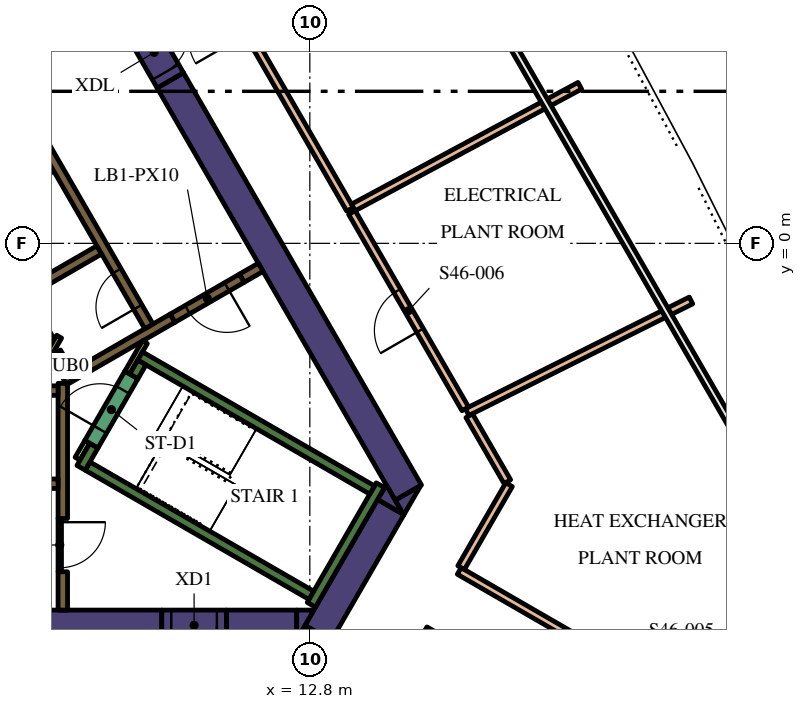
"""IFC4 building model, lengths in metres.
Left out: names, types, materials, properties, quantities, classifications, styles, units other than length and angle.
Written with IfcOpenShell. Run it as: python <this file> out.ifc"""

import sys

from ifc_helpers import new_model, si_unit, direction, frame, frame_2d, origin, place, context, subcontext, project, spatial, polyline, rectangle, outline, extrude, element, fill, save


model = new_model("IFC4")
c1 = context("Model", 3, precision=1e-05, world=origin(), true_north=direction((0.0, 1.0)))
c2 = subcontext(c1, "Body", "Model", "MODEL_VIEW")
j1 = project(units=[si_unit("LENGTHUNIT", "METRE"), si_unit("PLANEANGLEUNIT", "RADIAN")], contexts=[c1])
p1 = place(None, origin())
s1 = spatial("IfcSite", under=j1, at=p1, CompositionType="ELEMENT")
p2 = place(p1, origin())
s2 = spatial("IfcBuilding", under=s1, at=p2, CompositionType="ELEMENT")
p3 = place(p2, frame((0.0, 0.0, 196.2)))
s3 = spatial("IfcBuildingStorey", under=s2, at=p3, CompositionType="ELEMENT", Elevation=196.2)
p4 = place(p3, frame((9.129, 4.289, 0.0), z_axis=(0.0, 0.0, 1.0), x_axis=(0.499995742806, -0.866027861663, 0.0)))
e1 = element("IfcWall", 1, at=p4, inside=s3, PredefinedType="SOLIDWALL", context=c2, shape_type="SweptSolid", body=[
    extrude(rectangle(XDim=12.527, YDim=0.8, at=frame_2d((6.264, 0.0))), origin(), (0.0, 0.0, 1.0), 5.4),
])
p5 = place(p3, origin())
e2 = element("IfcWall", 2, at=p5, inside=s3, PredefinedType="SOLIDWALL", context=c2, shape_type="SweptSolid", body=[
    extrude(outline(polyline([(15.271, -7.15), (15.047, -6.762), (15.719, -6.374), (15.271, -7.15)])), origin(), (0.0, 0.0, 1.0), 5.4),
])
p6 = place(p3, frame((13.018, -10.252, 0.0), z_axis=(0.0, 0.0, 1.0), x_axis=(0.499984020225, 0.866034629516, 0.0)))
e3 = element("IfcWall", 3, at=p6, inside=s3, PredefinedType="SOLIDWALL", context=c2, shape_type="SweptSolid", body=[
    extrude(rectangle(XDim=3.824, YDim=0.8, at=frame_2d((1.912, 0.0))), origin(), (0.0, 0.0, 1.0), 5.4),
])
e4 = element("IfcWall", 4, at=p5, inside=s3, PredefinedType="SOLIDWALL", context=c2, shape_type="SweptSolid", body=[
    extrude(outline(polyline([(12.442, -10.45), (12.671, -10.053), (13.358, -10.45), (12.442, -10.45)])), origin(), (0.0, 0.0, 1.0), 5.4),
])
e5 = element("IfcWall", 5, at=p5, inside=s3, PredefinedType="SOLIDWALL", context=c2, shape_type="SweptSolid", body=[
    extrude(outline(polyline([(14.809, -6.35), (15.257, -7.126), (14.585, -6.738), (14.809, -6.35)])), origin(), (0.0, 0.0, 1.0), 5.4),
])
p7 = place(p3, frame((10.604, -10.05, 0.0), z_axis=(0.0, 0.0, 1.0), x_axis=(1.0, 0.0, 0.0)))
e6 = element("IfcWall", 6, at=p7, inside=s3, PredefinedType="SOLIDWALL", context=c2, shape_type="SweptSolid", body=[
    extrude(rectangle(XDim=1.849, YDim=0.8, at=frame_2d((0.925, 0.0))), origin(), (0.0, 0.0, 1.0), 5.4),
])
e7 = element("IfcWall", 7, at=p5, inside=s3, PredefinedType="SOLIDWALL", context=c2, shape_type="SweptSolid", body=[
    extrude(outline(polyline([(12.904, -9.65), (12.456, -10.426), (12.456, -9.65), (12.904, -9.65)])), origin(), (0.0, 0.0, 1.0), 5.4),
])
p8 = place(p3, frame((-13.378, -10.05, 0.0), z_axis=(0.0, 0.0, 1.0), x_axis=(1.0, 0.0, 0.0)))
e8 = element("IfcWall", 8, at=p8, inside=s3, PredefinedType="SOLIDWALL", context=c2, shape_type="SweptSolid", body=[
    extrude(rectangle(XDim=22.282, YDim=0.8, at=frame_2d((11.141, 0.0))), origin(), (0.0, 0.0, 1.0), 5.4),
])
p9 = place(p3, frame((12.84, -9.511, 0.0), z_axis=(0.0, 0.0, 1.0), x_axis=(0.499997733992, 0.866026712061, 0.0)))
e9 = element("IfcWall", 9, at=p9, inside=s3, PredefinedType="SOLIDWALL", context=c2, shape_type="SweptSolid", body=[
    extrude(rectangle(XDim=3.634, YDim=0.25, at=frame_2d((1.817, 0.0))), origin(), (0.0, 0.0, 1.0), 5.4),
])
p10 = place(p3, frame((12.84, -9.261, 0.0), z_axis=(0.0, 0.0, 1.0), x_axis=(-0.866013990052, 0.500019768644, 0.0)))
e10 = element("IfcWall", 10, at=p10, inside=s3, PredefinedType="SOLIDWALL", context=c2, shape_type="SweptSolid", body=[
    extrude(rectangle(XDim=6.8, YDim=0.25, at=frame_2d((3.4, 0.0))), origin(), (0.0, 0.0, 1.0), 5.4),
])
p11 = place(p3, frame((6.78, -5.906, 0.0), z_axis=(0.0, 0.0, 1.0), x_axis=(0.500223362819, 0.865896406789, 0.0)))
e11 = element("IfcWall", 11, at=p11, inside=s3, PredefinedType="SOLIDWALL", context=c2, shape_type="SweptSolid", body=[
    extrude(rectangle(XDim=0.675, YDim=0.25, at=frame_2d((0.337, 0.0))), origin(), (0.0, 0.0, 1.0), 5.4),
])
p12 = place(p3, frame((8.334, -2.964, 0.0), z_axis=(0.0, 0.0, 1.0), x_axis=(0.866016039709, -0.500016218704, 0.0)))
e12 = element("IfcWall", 12, at=p12, inside=s3, PredefinedType="SOLIDWALL", context=c2, shape_type="SweptSolid", body=[
    extrude(rectangle(XDim=7.05, YDim=0.25, at=frame_2d((3.525, 0.0))), origin(), (0.0, 0.0, 1.0), 5.4),
])
p13 = place(p3, frame((8.168, -3.503, 0.0), z_axis=(0.0, 0.0, 1.0), x_axis=(0.49972245349, 0.866185586049, 0.0)))
e13 = element("IfcWall", 13, at=p13, inside=s3, PredefinedType="SOLIDWALL", context=c2, shape_type="SweptSolid", body=[
    extrude(rectangle(XDim=0.425, YDim=0.25, at=frame_2d((0.212, 0.0))), origin(), (0.0, 0.0, 1.0), 5.4),
])
p14 = place(p3, frame((6.3, -7.24, 0.0), z_axis=(0.0, 0.0, 1.0), x_axis=(0.0, 1.0, 0.0)))
e14 = element("IfcWall", 14, at=p14, inside=s3, PredefinedType="SOLIDWALL", context=c2, shape_type="SweptSolid", body=[
    extrude(rectangle(XDim=3.556, YDim=0.25, at=frame_2d((1.778, 0.0))), origin(), (0.0, 0.0, 1.0), 5.4),
])
p15 = place(p3, frame((6.3, -9.65, 0.0), z_axis=(0.0, 0.0, 1.0), x_axis=(0.0, 1.0, 0.0)))
e15 = element("IfcWall", 15, at=p15, inside=s3, PredefinedType="SOLIDWALL", context=c2, shape_type="SweptSolid", body=[
    extrude(rectangle(XDim=1.008, YDim=0.25, at=frame_2d((0.504, 0.0))), origin(), (0.0, 0.0, 1.0), 5.4),
])
p16 = place(p3, frame((5.538, -3.875, 0.0), z_axis=(0.0, 0.0, 1.0), x_axis=(1.0, 0.0, 0.0)))
e16 = element("IfcWall", 16, at=p16, inside=s3, PredefinedType="SOLIDWALL", context=c2, shape_type="SweptSolid", body=[
    extrude(rectangle(XDim=0.637, YDim=0.25, at=frame_2d((0.318, 0.0))), origin(), (0.0, 0.0, 1.0), 5.4),
])
p17 = place(p3, frame((9.19, -1.969, 0.0), z_axis=(0.0, 0.0, 1.0), x_axis=(-0.866057109641, -0.499945079824, 0.0)))
e17 = element("IfcWall", 17, at=p17, inside=s3, PredefinedType="SOLIDWALL", context=c2, shape_type="SweptSolid", body=[
    extrude(rectangle(XDim=3.291, YDim=0.25, at=frame_2d((1.646, 0.0))), origin(), (0.0, 0.0, 1.0), 5.4),
])
p18 = place(p3, frame((6.13, -2.867, 0.0), z_axis=(0.0, 0.0, 1.0), x_axis=(0.500160776593, -0.865932559475, 0.0)))
e18 = element("IfcWall", 18, at=p18, inside=s3, PredefinedType="SOLIDWALL", context=c2, shape_type="SweptSolid", body=[
    extrude(rectangle(XDim=0.627, YDim=0.25, at=frame_2d((0.313, 0.0))), origin(), (0.0, 0.0, 1.0), 5.4),
])
p19 = place(p3, frame((11.507, -0.631, 0.0), z_axis=(0.0, 0.0, 1.0), x_axis=(-0.866093731455, -0.499881634324, 0.0)))
e19 = element("IfcWall", 19, at=p19, inside=s3, PredefinedType="SOLIDWALL", context=c2, shape_type="SweptSolid", body=[
    extrude(rectangle(XDim=0.575, YDim=0.25, at=frame_2d((0.288, 0.0))), origin(), (0.0, 0.0, 1.0), 5.4),
])
p20 = place(p3, frame((5.97, -2.591, 0.0), z_axis=(0.0, 0.0, 1.0), x_axis=(-0.499994469932, 0.866028596547, 0.0)))
e20 = element("IfcWall", 20, at=p20, inside=s3, PredefinedType="SOLIDWALL", context=c2, shape_type="SweptSolid", body=[
    extrude(rectangle(XDim=10.488, YDim=0.25, at=frame_2d((5.244, 0.0))), origin(), (0.0, 0.0, 1.0), 5.4),
])
for number, where, z_axis, x_axis in (
    (21, (4.094, 0.909, 0.0), (0.0, 0.0, 1.0), (0.866, 0.5, 0.0)),
    (22, (5.354, -1.274, 0.0), (0.0, 0.0, 1.0), (0.866, 0.5, 0.0)),
):
    element("IfcWall", number, at=place(p3, frame(where, z_axis=z_axis, x_axis=x_axis)), inside=s3, PredefinedType="SOLIDWALL", context=c2, shape_type="SweptSolid", body=[
        extrude(rectangle(XDim=2.2, YDim=0.25, at=frame_2d((1.1, 0.0))), origin(), (0.0, 0.0, 1.0), 5.4),
    ])
p21 = place(p3, frame((6.945, -5.222, 0.0), z_axis=(0.0, 0.0, 1.0), x_axis=(-0.499818422106, -0.866130212453, 0.0)))
e23 = element("IfcWall", 23, at=p21, inside=s3, PredefinedType="PARTITIONING", context=c2, shape_type="SweptSolid", body=[
    extrude(rectangle(XDim=0.514, YDim=0.15, at=frame_2d((0.257, 0.0))), origin(), (0.0, 0.0, 1.0), 4.65),
])
p22 = place(p3, frame((8.459, -2.599, 0.0), z_axis=(0.0, 0.0, 1.0), x_axis=(-0.500041054325, -0.866001699761, 0.0)))
e24 = element("IfcWall", 24, at=p22, inside=s3, PredefinedType="PARTITIONING", context=c2, shape_type="SweptSolid", body=[
    extrude(rectangle(XDim=0.929, YDim=0.15, at=frame_2d((0.464, 0.0))), origin(), (0.0, 0.0, 1.0), 5.4),
])
p23 = place(p3, frame((-6.175, -6.325, 0.0), z_axis=(0.0, 0.0, 1.0), x_axis=(1.0, 0.0, 0.0)))
e25 = element("IfcWall", 25, at=p23, inside=s3, PredefinedType="SOLIDWALL", context=c2, shape_type="SweptSolid", body=[
    extrude(rectangle(XDim=12.35, YDim=0.25, at=frame_2d((6.175, 0.0))), origin(), (0.0, 0.0, 1.0), 5.4),
])
p24 = place(p23, frame((0.585, 0.0, 0.0)))
e26 = element("IfcOpeningElement", 26, at=p24, cuts=e25, PredefinedType="OPENING", context=c2, shape_type="SweptSolid", body=[
    extrude(rectangle(XDim=1.1, YDim=2.1, at=frame_2d((0.55, 1.05))), frame((0.0, 0.135, 0.0), z_axis=(0.0, -1.0, 0.0), x_axis=(1.0, 0.0, 0.0)), (0.0, 0.0, 1.0), 0.27),
])
p25 = place(p23, frame((3.105, 0.0, 0.0)))
e27 = element("IfcOpeningElement", 27, at=p25, cuts=e25, PredefinedType="OPENING", context=c2, shape_type="SweptSolid", body=[
    extrude(rectangle(XDim=1.1, YDim=2.1, at=frame_2d((0.55, 1.05))), frame((0.0, 0.135, 0.0), z_axis=(0.0, -1.0, 0.0), x_axis=(1.0, 0.0, 0.0)), (0.0, 0.0, 1.0), 0.27),
])
p26 = place(p23, frame((5.625, 0.0, 0.0)))
e28 = element("IfcOpeningElement", 28, at=p26, cuts=e25, PredefinedType="OPENING", context=c2, shape_type="SweptSolid", body=[
    extrude(rectangle(XDim=1.1, YDim=2.1, at=frame_2d((0.55, 1.05))), frame((0.0, 0.135, 0.0), z_axis=(0.0, -1.0, 0.0), x_axis=(1.0, 0.0, 0.0)), (0.0, 0.0, 1.0), 0.27),
])
p27 = place(p23, frame((8.145, 0.0, 0.0)))
e29 = element("IfcOpeningElement", 29, at=p27, cuts=e25, PredefinedType="OPENING", context=c2, shape_type="SweptSolid", body=[
    extrude(rectangle(XDim=1.1, YDim=2.1, at=frame_2d((0.55, 1.05))), frame((0.0, 0.135, 0.0), z_axis=(0.0, -1.0, 0.0), x_axis=(1.0, 0.0, 0.0)), (0.0, 0.0, 1.0), 0.27),
])
p28 = place(p23, frame((10.665, 0.0, 0.0)))
e30 = element("IfcOpeningElement", 30, at=p28, cuts=e25, PredefinedType="OPENING", context=c2, shape_type="SweptSolid", body=[
    extrude(rectangle(XDim=1.1, YDim=2.1, at=frame_2d((0.55, 1.05))), frame((0.0, 0.135, 0.0), z_axis=(0.0, -1.0, 0.0), x_axis=(1.0, 0.0, 0.0)), (0.0, 0.0, 1.0), 0.27),
])
p29 = place(p3, frame((8.565, -2.185, 0.0), z_axis=(0.0, 0.0, 1.0), x_axis=(-0.499997954832, 0.866026584559, 0.0)))
e31 = element("IfcWall", 31, at=p29, inside=s3, PredefinedType="SOLIDWALL", context=c2, shape_type="SweptSolid", body=[
    extrude(rectangle(XDim=12.35, YDim=0.25, at=frame_2d((6.175, 0.0))), origin(), (0.0, 0.0, 1.0), 5.4),
])
p30 = place(p29, frame((0.585, 0.0, 0.0)))
e32 = element("IfcOpeningElement", 32, at=p30, cuts=e31, PredefinedType="OPENING", context=c2, shape_type="SweptSolid", body=[
    extrude(rectangle(XDim=1.1, YDim=2.1, at=frame_2d((0.55, 1.05))), frame((0.0, 0.135, 0.0), z_axis=(0.0, -1.0, 0.0), x_axis=(1.0, 0.0, 0.0)), (0.0, 0.0, 1.0), 0.27),
])
p31 = place(p3, frame((7.053, -5.284, 0.0), z_axis=(0.0, 0.0, 1.0), x_axis=(0.500078061341, 0.865980330357, 0.0)))
e33 = element("IfcWall", 33, at=p31, inside=s3, PredefinedType="SOLIDWALL", context=c2, shape_type="SweptSolid", body=[
    extrude(rectangle(XDim=2.1, YDim=0.4, at=frame_2d((1.05, 0.0))), origin(), (0.0, 0.0, 1.0), 5.4),
])
p32 = place(p31, frame((0.45, 0.0, 0.0)))
e34 = element("IfcOpeningElement", 34, at=p32, cuts=e33, PredefinedType="OPENING", context=c2, shape_type="SweptSolid", body=[
    extrude(rectangle(XDim=1.2, YDim=2.1, at=frame_2d((0.6, 1.05))), frame((0.0, 0.21, 0.0), z_axis=(0.0, -1.0, 0.0), x_axis=(1.0, 0.0, 0.0)), (0.0, 0.0, 1.0), 0.42),
])
p33 = place(p3, frame((6.203, -2.456, 0.0), z_axis=(0.0, 0.0, 1.0), x_axis=(-0.500043961785, -0.866000020948, 0.0)))
e35 = element("IfcWall", 35, at=p33, inside=s3, PredefinedType="PARTITIONING", context=c2, shape_type="SweptSolid", body=[
    extrude(rectangle(XDim=1.95, YDim=0.15, at=frame_2d((0.975, 0.0))), origin(), (0.0, 0.0, 1.0), 5.4),
])
p34 = place(p33, frame((0.45, 0.0, 0.0)))
e36 = element("IfcOpeningElement", 36, at=p34, cuts=e35, PredefinedType="OPENING", context=c2, shape_type="SweptSolid", body=[
    extrude(rectangle(XDim=0.9, YDim=2.1, at=frame_2d((0.45, 1.05))), frame((0.0, 0.085, 0.0), z_axis=(0.0, -1.0, 0.0), x_axis=(1.0, 0.0, 0.0)), (0.0, 0.0, 1.0), 0.17),
])
p35 = place(p3, frame((6.22, -7.237, 0.0), z_axis=(0.0, 0.0, 1.0), x_axis=(0.0, -1.0, 0.0)))
e37 = element("IfcWall", 37, at=p35, inside=s3, PredefinedType="PARTITIONING", context=c2, shape_type="SweptSolid", body=[
    extrude(rectangle(XDim=1.4, YDim=0.09, at=frame_2d((0.7, 0.0))), origin(), (0.0, 0.0, 1.0), 4.65),
])
p36 = place(p35, frame((0.1, 0.0, 0.0)))
e38 = element("IfcOpeningElement", 38, at=p36, cuts=e37, PredefinedType="OPENING", context=c2, shape_type="SweptSolid", body=[
    extrude(rectangle(XDim=1.2, YDim=2.1, at=frame_2d((0.6, 1.05))), frame((0.0, 0.055, 0.0), z_axis=(0.0, -1.0, 0.0), x_axis=(1.0, 0.0, 0.0)), (0.0, 0.0, 1.0), 0.11),
])
p37 = place(p3, frame((11.009, -0.919, 0.0), z_axis=(0.0, 0.0, 1.0), x_axis=(-0.866059744384, -0.49994051562, 0.0)))
e39 = element("IfcWall", 39, at=p37, inside=s3, PredefinedType="SOLIDWALL", context=c2, shape_type="SweptSolid", body=[
    extrude(rectangle(XDim=2.1, YDim=0.25, at=frame_2d((1.05, 0.0))), origin(), (0.0, 0.0, 1.0), 5.4),
])
p38 = place(p37, frame((0.45, 0.0, 0.0)))
e40 = element("IfcOpeningElement", 40, at=p38, cuts=e39, PredefinedType="OPENING", context=c2, shape_type="SweptSolid", body=[
    extrude(rectangle(XDim=1.2, YDim=2.1, at=frame_2d((0.6, 1.05))), frame((0.0, 0.135, 0.0), z_axis=(0.0, -1.0, 0.0), x_axis=(1.0, 0.0, 0.0)), (0.0, 0.0, 1.0), 0.27),
])
p39 = place(p3, frame((10.604, -10.05, 0.0), z_axis=(0.0, 0.0, 1.0), x_axis=(-1.0, 0.0, 0.0)))
e41 = element("IfcWall", 41, at=p39, inside=s3, PredefinedType="SOLIDWALL", context=c2, shape_type="SweptSolid", body=[
    extrude(rectangle(XDim=1.7, YDim=0.8, at=frame_2d((0.85, 0.0))), origin(), (0.0, 0.0, 1.0), 5.4),
])
p40 = place(p39, frame((0.25, 0.0, 0.0)))
e42 = element("IfcOpeningElement", 42, at=p40, cuts=e41, PredefinedType="OPENING", context=c2, shape_type="SweptSolid", body=[
    extrude(rectangle(XDim=1.2, YDim=2.1, at=frame_2d((0.6, 1.05))), frame((0.0, 0.41, 0.0), z_axis=(0.0, -1.0, 0.0), x_axis=(1.0, 0.0, 0.0)), (0.0, 0.0, 1.0), 0.82),
])
p41 = place(p3, frame((8.279, 5.761, 0.0), z_axis=(0.0, 0.0, 1.0), x_axis=(0.500062241894, -0.865989465428, 0.0)))
e43 = element("IfcWall", 43, at=p41, inside=s3, PredefinedType="SOLIDWALL", context=c2, shape_type="SweptSolid", body=[
    extrude(rectangle(XDim=1.7, YDim=0.8, at=frame_2d((0.85, 0.0))), origin(), (0.0, 0.0, 1.0), 5.4),
])
p42 = place(p41, frame((0.25, 0.0, 0.0)))
e44 = element("IfcOpeningElement", 44, at=p42, cuts=e43, PredefinedType="OPENING", context=c2, shape_type="SweptSolid", body=[
    extrude(rectangle(XDim=1.2, YDim=2.1, at=frame_2d((0.6, 1.05))), frame((0.0, 0.41, 0.0), z_axis=(0.0, -1.0, 0.0), x_axis=(1.0, 0.0, 0.0)), (0.0, 0.0, 1.0), 0.82),
])
p43 = place(p3, frame((13.858, 0.897, 0.0), z_axis=(0.0, 0.0, 1.0), x_axis=(-0.500005845305, 0.86602202897, 0.0)))
e45 = element("IfcWall", 45, at=p43, inside=s3, PredefinedType="PARTITIONING", context=c2, shape_type="SweptSolid", body=[
    extrude(rectangle(XDim=12.304, YDim=0.2, at=frame_2d((6.152, 0.0))), origin(), (0.0, 0.0, 1.0), 4.65),
])
p44 = place(p43, frame((5.352, 0.0, 0.0)))
e46 = element("IfcOpeningElement", 46, at=p44, cuts=e45, PredefinedType="OPENING", context=c2, shape_type="SweptSolid", body=[
    extrude(rectangle(XDim=1.6, YDim=2.1, at=frame_2d((0.8, 1.05))), frame((0.0, 0.11, 0.0), z_axis=(0.0, -1.0, 0.0), x_axis=(1.0, 0.0, 0.0)), (0.0, 0.0, 1.0), 0.22),
])
p45 = place(p3, frame((26.869, -14.474, 0.0), z_axis=(0.0, 0.0, 1.0), x_axis=(-0.866029647556, 0.4999926495, 0.0)))
e47 = element("IfcWall", 47, at=p45, inside=s3, PredefinedType="PARTITIONING", context=c2, shape_type="SweptSolid", body=[
    extrude(rectangle(XDim=11.706, YDim=0.2, at=frame_2d((5.853, 0.0))), origin(), (0.0, 0.0, 1.0), 4.65),
])
p46 = place(p45, frame((5.253, 0.0, 0.0)))
e48 = element("IfcOpeningElement", 48, at=p46, cuts=e47, PredefinedType="OPENING", context=c2, shape_type="SweptSolid", body=[
    extrude(rectangle(XDim=1.2, YDim=2.1, at=frame_2d((0.6, 1.05))), frame((0.0, 0.11, 0.0), z_axis=(0.0, -1.0, 0.0), x_axis=(1.0, 0.0, 0.0)), (0.0, 0.0, 1.0), 0.22),
])
p47 = place(p3, frame((15.831, -10.179, 0.0), z_axis=(0.0, 0.0, 1.0), x_axis=(0.866024433663, -0.500001680296, 0.0)))
e49 = element("IfcWall", 49, at=p47, inside=s3, PredefinedType="PARTITIONING", context=c2, shape_type="SweptSolid", body=[
    extrude(rectangle(XDim=11.706, YDim=0.2, at=frame_2d((5.853, 0.0))), origin(), (0.0, 0.0, 1.0), 4.65),
])
p48 = place(p47, frame((5.253, 0.0, 0.0)))
e50 = element("IfcOpeningElement", 50, at=p48, cuts=e49, PredefinedType="OPENING", context=c2, shape_type="SweptSolid", body=[
    extrude(rectangle(XDim=1.2, YDim=2.1, at=frame_2d((0.6, 1.05))), frame((0.0, 0.11, 0.0), z_axis=(0.0, -1.0, 0.0), x_axis=(1.0, 0.0, 0.0)), (0.0, 0.0, 1.0), 0.22),
])
p49 = place(p3, frame((13.946, 0.944, 0.0), z_axis=(0.0, 0.0, 1.0), x_axis=(0.880872932805, 0.473352803152, 0.0)))
e51 = element("IfcWall", 51, at=p49, inside=s3, PredefinedType="PARTITIONING", context=c2, shape_type="SweptSolid", body=[
    extrude(rectangle(XDim=6.764, YDim=0.2, at=frame_2d((3.382, 0.0))), origin(), (0.0, 0.0, 1.0), 4.65),
])
p50 = place(p3, frame((16.94, -4.441, 0.0), z_axis=(0.0, 0.0, 1.0), x_axis=(0.894923674163, 0.446219248153, 0.0)))
e52 = element("IfcWall", 52, at=p50, inside=s3, PredefinedType="PARTITIONING", context=c2, shape_type="SweptSolid", body=[
    extrude(rectangle(XDim=6.582, YDim=0.2, at=frame_2d((3.291, 0.0))), origin(), (0.0, 0.0, 1.0), 4.65),
])
p51 = place(p3, frame((16.89, -4.354, 0.0), z_axis=(0.0, 0.0, 1.0), x_axis=(-0.500004760619, 0.866022655223, 0.0)))
e53 = element("IfcWall", 53, at=p51, inside=s3, PredefinedType="PARTITIONING", context=c2, shape_type="SweptSolid", body=[
    extrude(rectangle(XDim=5.964, YDim=0.2, at=frame_2d((2.982, 0.0))), origin(), (0.0, 0.0, 1.0), 4.65),
])
p52 = place(p51, frame((2.382, 0.0, 0.0)))
e54 = element("IfcOpeningElement", 54, at=p52, cuts=e53, PredefinedType="OPENING", context=c2, shape_type="SweptSolid", body=[
    extrude(rectangle(XDim=1.2, YDim=2.1, at=frame_2d((0.6, 1.05))), frame((0.0, 0.11, 0.0), z_axis=(0.0, -1.0, 0.0), x_axis=(1.0, 0.0, 0.0)), (0.0, 0.0, 1.0), 0.22),
])
p53 = place(p3, frame((18.042, -6.35, 0.0), z_axis=(0.0, 0.0, 1.0), x_axis=(-0.500043699366, -0.866000172474, 0.0)))
e55 = element("IfcWall", 55, at=p53, inside=s3, PredefinedType="PARTITIONING", context=c2, shape_type="SweptSolid", body=[
    extrude(rectangle(XDim=2.522, YDim=0.2, at=frame_2d((1.261, 0.0))), origin(), (0.0, 0.0, 1.0), 4.65),
])
p54 = place(p3, frame((16.995, -4.536, 0.0), z_axis=(0.0, 0.0, 1.0), x_axis=(0.499989486807, -0.866031473494, 0.0)))
e56 = element("IfcWall", 56, at=p54, inside=s3, PredefinedType="PARTITIONING", context=c2, shape_type="SweptSolid", body=[
    extrude(rectangle(XDim=2.005, YDim=0.2, at=frame_2d((1.002, 0.0))), origin(), (0.0, 0.0, 1.0), 4.65),
])
p55 = place(p30, origin())
e57 = element("IfcDoor", 57, at=p55, inside=s3, OperationType="DOUBLE_DOOR_SLIDING", PredefinedType="DOOR", context=c2, shape_type="SweptSolid", body=[
    extrude(rectangle(XDim=1.1, YDim=2.1, at=frame_2d((0.55, 1.05))), frame((0.0, 0.025, 0.0), z_axis=(0.0, -1.0, 0.0), x_axis=(1.0, 0.0, 0.0)), (0.0, 0.0, 1.0), 0.05),
])
fill(e32, e57)
p56 = place(p32, origin())
e58 = element("IfcDoor", 58, at=p56, inside=s3, OperationType="SINGLE_SWING_LEFT", PredefinedType="DOOR", context=c2, shape_type="SweptSolid", body=[
    extrude(rectangle(XDim=1.2, YDim=2.1, at=frame_2d((0.6, 1.05))), frame((0.0, 0.025, 0.0), z_axis=(0.0, -1.0, 0.0), x_axis=(1.0, 0.0, 0.0)), (0.0, 0.0, 1.0), 0.05),
])
fill(e34, e58)
p57 = place(p36, origin())
e59 = element("IfcDoor", 59, at=p57, inside=s3, OperationType="SINGLE_SWING_LEFT", PredefinedType="DOOR", context=c2, shape_type="SweptSolid", body=[
    extrude(rectangle(XDim=1.2, YDim=2.1, at=frame_2d((0.6, 1.05))), frame((0.0, 0.025, 0.0), z_axis=(0.0, -1.0, 0.0), x_axis=(1.0, 0.0, 0.0)), (0.0, 0.0, 1.0), 0.05),
])
fill(e38, e59)
p58 = place(p38, origin())
e60 = element("IfcDoor", 60, at=p58, inside=s3, OperationType="SINGLE_SWING_LEFT", PredefinedType="DOOR", context=c2, shape_type="SweptSolid", body=[
    extrude(rectangle(XDim=1.2, YDim=2.1, at=frame_2d((0.6, 1.05))), frame((0.0, 0.025, 0.0), z_axis=(0.0, -1.0, 0.0), x_axis=(1.0, 0.0, 0.0)), (0.0, 0.0, 1.0), 0.05),
])
fill(e40, e60)
p59 = place(p40, origin())
e61 = element("IfcDoor", 61, at=p59, inside=s3, OperationType="SINGLE_SWING_LEFT", PredefinedType="DOOR", context=c2, shape_type="SweptSolid", body=[
    extrude(rectangle(XDim=1.2, YDim=2.1, at=frame_2d((0.6, 1.05))), frame((0.0, 0.025, 0.0), z_axis=(0.0, -1.0, 0.0), x_axis=(1.0, 0.0, 0.0)), (0.0, 0.0, 1.0), 0.05),
])
fill(e42, e61)
p60 = place(p42, origin())
e62 = element("IfcDoor", 62, at=p60, inside=s3, OperationType="SINGLE_SWING_LEFT", PredefinedType="DOOR", context=c2, shape_type="SweptSolid", body=[
    extrude(rectangle(XDim=1.2, YDim=2.1, at=frame_2d((0.6, 1.05))), frame((0.0, 0.025, 0.0), z_axis=(0.0, -1.0, 0.0), x_axis=(1.0, 0.0, 0.0)), (0.0, 0.0, 1.0), 0.05),
])
fill(e44, e62)
p61 = place(p52, origin())
e63 = element("IfcDoor", 63, at=p61, inside=s3, OperationType="SINGLE_SWING_RIGHT", PredefinedType="DOOR", context=c2, shape_type="SweptSolid", body=[
    extrude(rectangle(XDim=1.2, YDim=2.1, at=frame_2d((0.6, 1.05))), frame((0.0, 0.025, 0.0), z_axis=(0.0, -1.0, 0.0), x_axis=(1.0, 0.0, 0.0)), (0.0, 0.0, 1.0), 0.05),
])
fill(e54, e63)
save(model, sys.argv[1])
